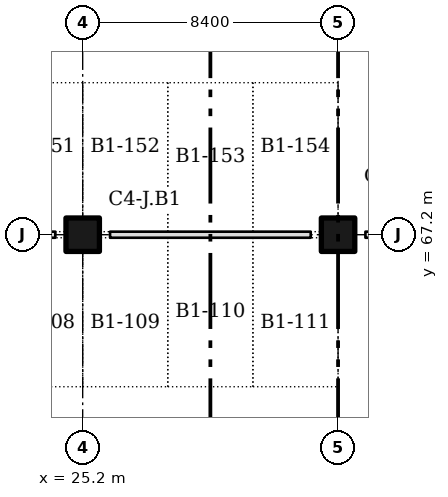
"""IFC4 building model, lengths in metres.
Left out: names, types, materials, properties, quantities, classifications, styles, units other than length and angle.
Written with IfcOpenShell. Run it as: python <this file> out.ifc"""

import sys

from ifc_helpers import new_model, si_unit, direction, frame, frame_2d, origin, origin_2d, place, context, subcontext, project, spatial, rectangle, extrude, element, save


model = new_model("IFC4")
c1 = context("Model", 3, precision=1e-05, world=origin(), true_north=direction((0.0, 1.0)))
c2 = subcontext(c1, "Body", "Model", "MODEL_VIEW")
j1 = project(units=[si_unit("LENGTHUNIT", "METRE"), si_unit("PLANEANGLEUNIT", "RADIAN")], contexts=[c1])
p1 = place(None, origin())
s1 = spatial("IfcSite", under=j1, at=p1, CompositionType="ELEMENT")
p2 = place(p1, origin())
s2 = spatial("IfcBuilding", under=s1, at=p2, CompositionType="ELEMENT")
p3 = place(p2, frame((0.0, 0.0, -4.0)))
s3 = spatial("IfcBuildingStorey", under=s2, at=p3, CompositionType="ELEMENT", Elevation=-4.0)
for number, where, z_axis, x_axis in (
    (1, (25.2, 67.2, 0.0), (0.0, 0.0, 1.0), (1.0, 0.0, 0.0)),
    (2, (33.6, 67.2, 0.0), (0.0, 0.0, 1.0), (1.0, 0.0, 0.0)),
):
    element("IfcColumn", number, at=place(p3, frame(where, z_axis=z_axis, x_axis=x_axis)), inside=s3, PredefinedType="COLUMN", context=c2, shape_type="SweptSolid", body=[
        extrude(rectangle(XDim=1.1, YDim=1.1, at=origin_2d()), origin(), (0.0, 0.0, 1.0), 3.6),
    ])
p4 = place(p3, frame((19.7, 67.2, 0.0), z_axis=(0.0, 0.0, 1.0), x_axis=(1.0, 0.0, 0.0)))
e3 = element("IfcWall", 3, at=p4, inside=s3, PredefinedType="PARTITIONING", context=c2, shape_type="SweptSolid", body=[
    extrude(rectangle(XDim=4.6, YDim=0.2, at=frame_2d((2.3, 0.0))), origin(), (0.0, 0.0, 1.0), 3.6),
])
p5 = place(p3, frame((26.1, 67.2, 0.0), z_axis=(0.0, 0.0, 1.0), x_axis=(1.0, 0.0, 0.0)))
e4 = element("IfcWall", 4, at=p5, inside=s3, PredefinedType="PARTITIONING", context=c2, shape_type="SweptSolid", body=[
    extrude(rectangle(XDim=6.6, YDim=0.2, at=frame_2d((3.3, 0.0))), origin(), (0.0, 0.0, 1.0), 3.6),
])
p6 = place(p3, frame((34.5, 67.2, 0.0), z_axis=(0.0, 0.0, 1.0), x_axis=(1.0, 0.0, 0.0)))
e5 = element("IfcWall", 5, at=p6, inside=s3, PredefinedType="PARTITIONING", context=c2, shape_type="SweptSolid", body=[
    extrude(rectangle(XDim=6.6, YDim=0.2, at=frame_2d((3.3, 0.0))), origin(), (0.0, 0.0, 1.0), 3.6),
])
p7 = place(p6, frame((0.3, 0.0, 0.0)))
e6 = element("IfcOpeningElement", 6, at=p7, cuts=e5, PredefinedType="OPENING", context=c2, shape_type="SweptSolid", body=[
    extrude(rectangle(XDim=4.8, YDim=2.4, at=frame_2d((2.4, 1.2))), frame((0.0, 0.11, 0.0), z_axis=(0.0, -1.0, 0.0), x_axis=(1.0, 0.0, 0.0)), (0.0, 0.0, 1.0), 0.22),
])
p8 = place(p6, frame((5.3, 0.0, 0.0)))
e7 = element("IfcOpeningElement", 7, at=p8, cuts=e5, PredefinedType="OPENING", context=c2, shape_type="SweptSolid", body=[
    extrude(rectangle(XDim=1.0, YDim=2.1, at=frame_2d((0.5, 1.05))), frame((0.0, 0.11, 0.0), z_axis=(0.0, -1.0, 0.0), x_axis=(1.0, 0.0, 0.0)), (0.0, 0.0, 1.0), 0.22),
])
save(model, sys.argv[1])
